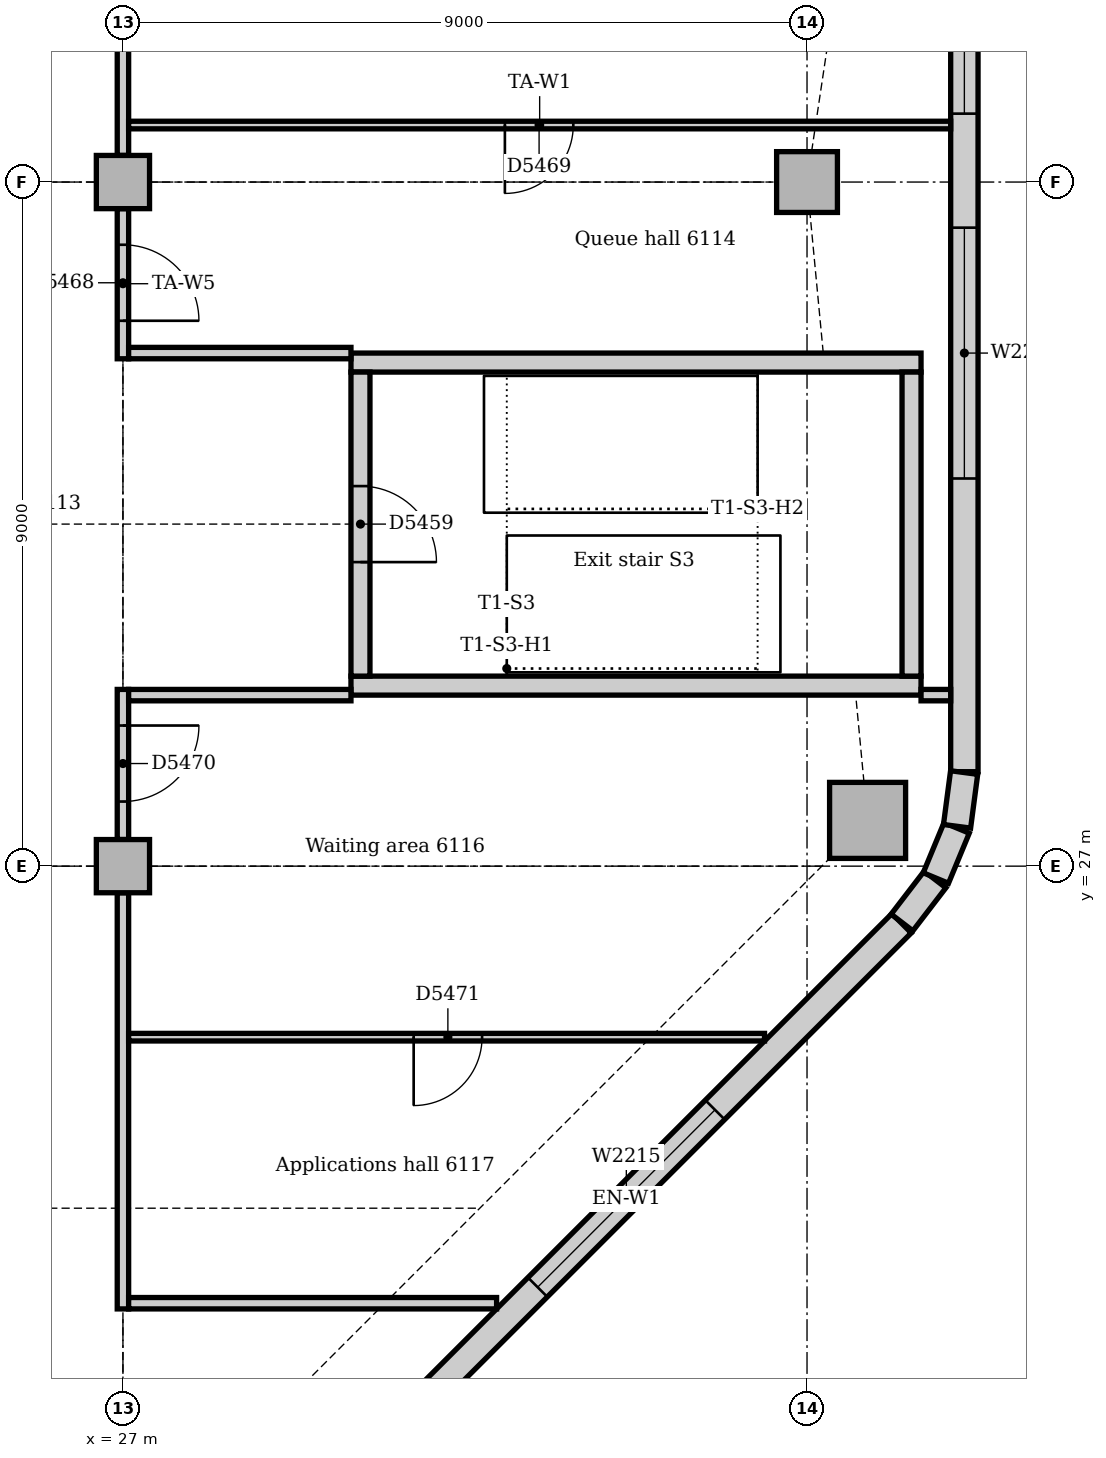
"""IFC4 building model, lengths in metres.
Left out: names, types, materials, properties, quantities, classifications, styles, units other than length and angle.
Written with IfcOpenShell. Run it as: python <this file> out.ifc"""

import sys

from ifc_helpers import new_model, si_unit, direction, frame, frame_2d, origin, origin_2d, place, context, subcontext, project, spatial, rectangle, extrude, element, fill, save


model = new_model("IFC4")
c1 = context("Model", 3, precision=1e-05, world=origin(), true_north=direction((0.0, 1.0)))
c2 = subcontext(c1, "Body", "Model", "MODEL_VIEW")
j1 = project(units=[si_unit("LENGTHUNIT", "METRE"), si_unit("PLANEANGLEUNIT", "RADIAN")], contexts=[c1])
p1 = place(None, origin())
s1 = spatial("IfcSite", under=j1, at=p1, CompositionType="ELEMENT")
p2 = place(p1, origin())
s2 = spatial("IfcBuilding", under=s1, at=p2, CompositionType="ELEMENT")
p3 = place(p2, frame((0.0, 0.0, 255.0)))
s3 = spatial("IfcBuildingStorey", under=s2, at=p3, CompositionType="ELEMENT", Elevation=255.0)
for number, where, z_axis, x_axis in (
    (1, (30.0, 29.375, 0.0), (0.0, 0.0, 1.0), (1.0, 0.0, 0.0)),
    (2, (37.5, 33.625, 0.0), (0.0, 0.0, 1.0), (-1.0, 0.0, 0.0)),
):
    element("IfcWall", number, at=place(p3, frame(where, z_axis=z_axis, x_axis=x_axis)), inside=s3, PredefinedType="SOLIDWALL", context=c2, shape_type="SweptSolid", body=[
        extrude(rectangle(XDim=7.5, YDim=0.25, at=frame_2d((3.75, 0.0))), origin(), (0.0, 0.0, 1.0), 4.0),
    ])
p4 = place(p3, frame((37.375, 29.5, 0.0), z_axis=(0.0, 0.0, 1.0), x_axis=(0.0, 1.0, 0.0)))
e3 = element("IfcWall", 3, at=p4, inside=s3, PredefinedType="SOLIDWALL", context=c2, shape_type="SweptSolid", body=[
    extrude(rectangle(XDim=4.0, YDim=0.25, at=frame_2d((2.0, 0.0))), origin(), (0.0, 0.0, 1.0), 4.0),
])
p5 = place(p3, frame((30.125, 33.5, 0.0), z_axis=(0.0, 0.0, 1.0), x_axis=(0.0, -1.0, 0.0)))
e4 = element("IfcWall", 4, at=p5, inside=s3, PredefinedType="SOLIDWALL", context=c2, shape_type="SweptSolid", body=[
    extrude(rectangle(XDim=4.0, YDim=0.25, at=frame_2d((2.0, 0.0))), origin(), (0.0, 0.0, 1.0), 4.0),
])
p6 = place(p5, frame((1.5, 0.0, 0.0)))
e5 = element("IfcOpeningElement", 5, at=p6, cuts=e4, PredefinedType="OPENING", context=c2, shape_type="SweptSolid", body=[
    extrude(rectangle(XDim=1.0, YDim=2.1, at=frame_2d((0.5, 1.05))), frame((0.0, 0.135, 0.0), z_axis=(0.0, -1.0, 0.0), x_axis=(1.0, 0.0, 0.0)), (0.0, 0.0, 1.0), 0.27),
])
p7 = place(p3, frame((36.797, 27.602, 0.0), z_axis=(0.0, 0.0, 1.0), x_axis=(1.0, 0.0, 0.0)))
e6 = element("IfcColumn", 6, at=p7, inside=s3, PredefinedType="COLUMN", context=c2, shape_type="SweptSolid", body=[
    extrude(rectangle(XDim=1.0, YDim=1.0, at=origin_2d()), origin(), (0.0, 0.0, 1.0), 3.85),
])
p8 = place(p3, frame((36.0, 36.0, 0.0), z_axis=(0.0, 0.0, 1.0), x_axis=(1.0, 0.0, 0.0)))
e7 = element("IfcColumn", 7, at=p8, inside=s3, PredefinedType="COLUMN", context=c2, shape_type="SweptSolid", body=[
    extrude(rectangle(XDim=0.8, YDim=0.8, at=origin_2d()), origin(), (0.0, 0.0, 1.0), 3.85),
])
for number, where, z_axis, x_axis in (
    (8, (27.0, 27.0, 0.0), (0.0, 0.0, 1.0), (1.0, 0.0, 0.0)),
    (9, (27.0, 36.0, 0.0), (0.0, 0.0, 1.0), (1.0, 0.0, 0.0)),
):
    element("IfcColumn", number, at=place(p3, frame(where, z_axis=z_axis, x_axis=x_axis)), inside=s3, PredefinedType="COLUMN", context=c2, shape_type="SweptSolid", body=[
        extrude(rectangle(XDim=0.7, YDim=0.7, at=origin_2d()), origin(), (0.0, 0.0, 1.0), 3.85),
    ])
p9 = place(p3, frame((30.001, 19.006, 0.0), z_axis=(0.0, 0.0, 1.0), x_axis=(0.707106781187, 0.707106781187, 0.0)))
e10 = element("IfcWall", 10, at=p9, inside=s3, PredefinedType="STANDARD", context=c2, shape_type="SweptSolid", body=[
    extrude(rectangle(XDim=10.243, YDim=0.36, at=frame_2d((5.121, 0.0))), origin(), (0.0, 0.0, 1.0), 3.85),
])
p10 = place(p9, frame((3.471, 0.0, 0.9)))
e11 = element("IfcOpeningElement", 11, at=p10, cuts=e10, PredefinedType="OPENING", context=c2, shape_type="SweptSolid", body=[
    extrude(rectangle(XDim=3.3, YDim=1.6, at=frame_2d((1.65, 0.8))), frame((0.0, 0.19, 0.0), z_axis=(0.0, -1.0, 0.0), x_axis=(1.0, 0.0, 0.0)), (0.0, 0.0, 1.0), 0.38),
])
p11 = place(p3, frame((38.07, 28.243, 0.0), z_axis=(0.0, 0.0, 1.0), x_axis=(0.0, 1.0, 0.0)))
e12 = element("IfcWall", 12, at=p11, inside=s3, PredefinedType="STANDARD", context=c2, shape_type="SweptSolid", body=[
    extrude(rectangle(XDim=24.515, YDim=0.36, at=frame_2d((12.257, 0.0))), origin(), (0.0, 0.0, 1.0), 3.85),
])
p12 = place(p11, frame((3.857, 0.0, 0.9)))
e13 = element("IfcOpeningElement", 13, at=p12, cuts=e12, PredefinedType="OPENING", context=c2, shape_type="SweptSolid", body=[
    extrude(rectangle(XDim=3.3, YDim=1.6, at=frame_2d((1.65, 0.8))), frame((0.0, 0.19, 0.0), z_axis=(0.0, -1.0, 0.0), x_axis=(1.0, 0.0, 0.0)), (0.0, 0.0, 1.0), 0.38),
])
p13 = place(p11, frame((8.657, 0.0, 0.9)))
e14 = element("IfcOpeningElement", 14, at=p13, cuts=e12, PredefinedType="OPENING", context=c2, shape_type="SweptSolid", body=[
    extrude(rectangle(XDim=3.3, YDim=1.6, at=frame_2d((1.65, 0.8))), frame((0.0, 0.19, 0.0), z_axis=(0.0, -1.0, 0.0), x_axis=(1.0, 0.0, 0.0)), (0.0, 0.0, 1.0), 0.38),
])
p14 = place(p11, frame((12.857, 0.0, 0.9)))
e15 = element("IfcOpeningElement", 15, at=p14, cuts=e12, PredefinedType="OPENING", context=c2, shape_type="SweptSolid", body=[
    extrude(rectangle(XDim=3.3, YDim=1.6, at=frame_2d((1.65, 0.8))), frame((0.0, 0.19, 0.0), z_axis=(0.0, -1.0, 0.0), x_axis=(1.0, 0.0, 0.0)), (0.0, 0.0, 1.0), 0.38),
])
p15 = place(p11, frame((17.357, 0.0, 0.9)))
e16 = element("IfcOpeningElement", 16, at=p15, cuts=e12, PredefinedType="OPENING", context=c2, shape_type="SweptSolid", body=[
    extrude(rectangle(XDim=3.3, YDim=1.6, at=frame_2d((1.65, 0.8))), frame((0.0, 0.19, 0.0), z_axis=(0.0, -1.0, 0.0), x_axis=(1.0, 0.0, 0.0)), (0.0, 0.0, 1.0), 0.38),
])
p16 = place(p3, frame((37.25, 26.259, 0.0), z_axis=(0.0, 0.0, 1.0), x_axis=(0.608802368033, 0.793321924995, 0.0)))
e17 = element("IfcWall", 17, at=p16, inside=s3, PredefinedType="STANDARD", context=c2, shape_type="SweptSolid", body=[
    extrude(rectangle(XDim=0.713, YDim=0.36, at=frame_2d((0.357, 0.0))), origin(), (0.0, 0.0, 1.0), 3.85),
])
for number, where, z_axis, x_axis in (
    (18, (37.695, 26.844, 0.0), (0.0, 0.0, 1.0), (0.383, 0.924, 0.0)),
    (19, (37.974, 27.524, 0.0), (0.0, 0.0, 1.0), (0.131, 0.991, 0.0)),
):
    element("IfcWall", number, at=place(p3, frame(where, z_axis=z_axis, x_axis=x_axis)), inside=s3, PredefinedType="STANDARD", context=c2, shape_type="SweptSolid", body=[
        extrude(rectangle(XDim=0.713, YDim=0.36, at=frame_2d((0.356, 0.0))), origin(), (0.0, 0.0, 1.0), 3.85),
    ])
p17 = place(p3, frame((27.0, 33.675, 0.0), z_axis=(0.0, 0.0, 1.0), x_axis=(0.0, 1.0, 0.0)))
e20 = element("IfcWall", 20, at=p17, inside=s3, PredefinedType="PARTITIONING", context=c2, shape_type="SweptSolid", body=[
    extrude(rectangle(XDim=1.975, YDim=0.15, at=frame_2d((0.988, 0.0))), origin(), (0.0, 0.0, 1.0), 3.4),
])
p18 = place(p17, frame((0.5, 0.0, 0.0)))
e21 = element("IfcOpeningElement", 21, at=p18, cuts=e20, PredefinedType="OPENING", context=c2, shape_type="SweptSolid", body=[
    extrude(rectangle(XDim=1.0, YDim=2.1, at=frame_2d((0.5, 1.05))), frame((0.0, 0.085, 0.0), z_axis=(0.0, -1.0, 0.0), x_axis=(1.0, 0.0, 0.0)), (0.0, 0.0, 1.0), 0.17),
])
p19 = place(p3, frame((27.0, 36.35, 0.0), z_axis=(0.0, 0.0, 1.0), x_axis=(0.0, 1.0, 0.0)))
e22 = element("IfcWall", 22, at=p19, inside=s3, PredefinedType="PARTITIONING", context=c2, shape_type="SweptSolid", body=[
    extrude(rectangle(XDim=7.4, YDim=0.15, at=frame_2d((3.7, 0.0))), origin(), (0.0, 0.0, 1.0), 3.4),
])
p20 = place(p3, frame((27.0, 21.175, 0.0), z_axis=(0.0, 0.0, 1.0), x_axis=(0.0, 1.0, 0.0)))
e23 = element("IfcWall", 23, at=p20, inside=s3, PredefinedType="PARTITIONING", context=c2, shape_type="SweptSolid", body=[
    extrude(rectangle(XDim=5.475, YDim=0.15, at=frame_2d((2.737, 0.0))), origin(), (0.0, 0.0, 1.0), 3.4),
])
p21 = place(p3, frame((27.0, 27.35, 0.0), z_axis=(0.0, 0.0, 1.0), x_axis=(0.0, 1.0, 0.0)))
e24 = element("IfcWall", 24, at=p21, inside=s3, PredefinedType="PARTITIONING", context=c2, shape_type="SweptSolid", body=[
    extrude(rectangle(XDim=1.975, YDim=0.15, at=frame_2d((0.988, 0.0))), origin(), (0.0, 0.0, 1.0), 3.4),
])
p22 = place(p21, frame((0.5, 0.0, 0.0)))
e25 = element("IfcOpeningElement", 25, at=p22, cuts=e24, PredefinedType="OPENING", context=c2, shape_type="SweptSolid", body=[
    extrude(rectangle(XDim=1.0, YDim=2.1, at=frame_2d((0.5, 1.05))), frame((0.0, 0.085, 0.0), z_axis=(0.0, -1.0, 0.0), x_axis=(1.0, 0.0, 0.0)), (0.0, 0.0, 1.0), 0.17),
])
p23 = place(p3, frame((27.075, 21.25, 0.0), z_axis=(0.0, 0.0, 1.0), x_axis=(1.0, 0.0, 0.0)))
e26 = element("IfcWall", 26, at=p23, inside=s3, PredefinedType="PARTITIONING", context=c2, shape_type="SweptSolid", body=[
    extrude(rectangle(XDim=4.841, YDim=0.15, at=frame_2d((2.421, 0.0))), origin(), (0.0, 0.0, 1.0), 3.85),
])
for number, where, z_axis, x_axis in (
    (27, (27.075, 29.25, 0.0), (0.0, 0.0, 1.0), (1.0, 0.0, 0.0)),
    (28, (27.075, 33.75, 0.0), (0.0, 0.0, 1.0), (1.0, 0.0, 0.0)),
):
    element("IfcWall", number, at=place(p3, frame(where, z_axis=z_axis, x_axis=x_axis)), inside=s3, PredefinedType="PARTITIONING", context=c2, shape_type="SweptSolid", body=[
        extrude(rectangle(XDim=2.925, YDim=0.15, at=frame_2d((1.462, 0.0))), origin(), (0.0, 0.0, 1.0), 3.85),
    ])
p24 = place(p3, frame((37.5, 29.25, 0.0), z_axis=(0.0, 0.0, 1.0), x_axis=(1.0, 0.0, 0.0)))
e29 = element("IfcWall", 29, at=p24, inside=s3, PredefinedType="PARTITIONING", context=c2, shape_type="SweptSolid", body=[
    extrude(rectangle(XDim=0.39, YDim=0.15, at=frame_2d((0.195, 0.0))), origin(), (0.0, 0.0, 1.0), 3.85),
])
p25 = place(p3, frame((27.075, 36.75, 0.0), z_axis=(0.0, 0.0, 1.0), x_axis=(1.0, 0.0, 0.0)))
e30 = element("IfcWall", 30, at=p25, inside=s3, PredefinedType="PARTITIONING", context=c2, shape_type="SweptSolid", body=[
    extrude(rectangle(XDim=10.815, YDim=0.1, at=frame_2d((5.407, 0.0))), origin(), (0.0, 0.0, 1.0), 3.85),
])
p26 = place(p25, frame((4.95, 0.0, 0.0)))
e31 = element("IfcOpeningElement", 31, at=p26, cuts=e30, PredefinedType="OPENING", context=c2, shape_type="SweptSolid", body=[
    extrude(rectangle(XDim=0.9, YDim=2.1, at=frame_2d((0.45, 1.05))), frame((0.0, 0.06, 0.0), z_axis=(0.0, -1.0, 0.0), x_axis=(1.0, 0.0, 0.0)), (0.0, 0.0, 1.0), 0.12),
])
p27 = place(p3, frame((27.075, 24.75, 0.0), z_axis=(0.0, 0.0, 1.0), x_axis=(1.0, 0.0, 0.0)))
e32 = element("IfcWall", 32, at=p27, inside=s3, PredefinedType="PARTITIONING", context=c2, shape_type="SweptSolid", body=[
    extrude(rectangle(XDim=8.366, YDim=0.1, at=frame_2d((4.183, 0.0))), origin(), (0.0, 0.0, 1.0), 3.85),
])
p28 = place(p27, frame((3.75, 0.0, 0.0)))
e33 = element("IfcOpeningElement", 33, at=p28, cuts=e32, PredefinedType="OPENING", context=c2, shape_type="SweptSolid", body=[
    extrude(rectangle(XDim=0.9, YDim=2.1, at=frame_2d((0.45, 1.05))), frame((0.0, 0.06, 0.0), z_axis=(0.0, -1.0, 0.0), x_axis=(1.0, 0.0, 0.0)), (0.0, 0.0, 1.0), 0.12),
])
p29 = place(p10, origin())
e34 = element("IfcWindow", 34, at=p29, inside=s3, PartitioningType="SINGLE_PANEL", PredefinedType="WINDOW", context=c2, shape_type="SweptSolid", body=[
    extrude(rectangle(XDim=3.3, YDim=1.6, at=frame_2d((1.65, 0.8))), frame((0.0, 0.13, 0.0), z_axis=(0.0, -1.0, 0.0), x_axis=(1.0, 0.0, 0.0)), (0.0, 0.0, 1.0), 0.06),
])
fill(e11, e34)
p30 = place(p12, origin())
e35 = element("IfcWindow", 35, at=p30, inside=s3, PartitioningType="SINGLE_PANEL", PredefinedType="WINDOW", context=c2, shape_type="SweptSolid", body=[
    extrude(rectangle(XDim=3.3, YDim=1.6, at=frame_2d((1.65, 0.8))), frame((0.0, 0.13, 0.0), z_axis=(0.0, -1.0, 0.0), x_axis=(1.0, 0.0, 0.0)), (0.0, 0.0, 1.0), 0.06),
])
fill(e13, e35)
p31 = place(p13, origin())
e36 = element("IfcWindow", 36, at=p31, inside=s3, PartitioningType="SINGLE_PANEL", PredefinedType="WINDOW", context=c2, shape_type="SweptSolid", body=[
    extrude(rectangle(XDim=3.3, YDim=1.6, at=frame_2d((1.65, 0.8))), frame((0.0, 0.13, 0.0), z_axis=(0.0, -1.0, 0.0), x_axis=(1.0, 0.0, 0.0)), (0.0, 0.0, 1.0), 0.06),
])
fill(e14, e36)
p32 = place(p6, origin())
e37 = element("IfcDoor", 37, at=p32, inside=s3, OperationType="SINGLE_SWING_RIGHT", PredefinedType="DOOR", context=c2, shape_type="SweptSolid", body=[
    extrude(rectangle(XDim=1.0, YDim=2.1, at=frame_2d((0.5, 1.05))), frame((0.0, 0.025, 0.0), z_axis=(0.0, -1.0, 0.0), x_axis=(1.0, 0.0, 0.0)), (0.0, 0.0, 1.0), 0.05),
])
fill(e5, e37)
p33 = place(p18, frame((1.0, 0.0, 0.0), z_axis=(0.0, 0.0, 1.0), x_axis=(-1.0, 0.0, 0.0)))
e38 = element("IfcDoor", 38, at=p33, inside=s3, OperationType="SINGLE_SWING_RIGHT", PredefinedType="DOOR", context=c2, shape_type="SweptSolid", body=[
    extrude(rectangle(XDim=1.0, YDim=2.1, at=frame_2d((0.5, 1.05))), frame((0.0, 0.025, 0.0), z_axis=(0.0, -1.0, 0.0), x_axis=(1.0, 0.0, 0.0)), (0.0, 0.0, 1.0), 0.05),
])
fill(e21, e38)
p34 = place(p26, frame((0.9, 0.0, 0.0), z_axis=(0.0, 0.0, 1.0), x_axis=(-1.0, 0.0, 0.0)))
e39 = element("IfcDoor", 39, at=p34, inside=s3, OperationType="SINGLE_SWING_RIGHT", PredefinedType="DOOR", context=c2, shape_type="SweptSolid", body=[
    extrude(rectangle(XDim=0.9, YDim=2.1, at=frame_2d((0.45, 1.05))), frame((0.0, 0.025, 0.0), z_axis=(0.0, -1.0, 0.0), x_axis=(1.0, 0.0, 0.0)), (0.0, 0.0, 1.0), 0.05),
])
fill(e31, e39)
p35 = place(p22, frame((1.0, 0.0, 0.0), z_axis=(0.0, 0.0, 1.0), x_axis=(-1.0, 0.0, 0.0)))
e40 = element("IfcDoor", 40, at=p35, inside=s3, OperationType="SINGLE_SWING_LEFT", PredefinedType="DOOR", context=c2, shape_type="SweptSolid", body=[
    extrude(rectangle(XDim=1.0, YDim=2.1, at=frame_2d((0.5, 1.05))), frame((0.0, 0.025, 0.0), z_axis=(0.0, -1.0, 0.0), x_axis=(1.0, 0.0, 0.0)), (0.0, 0.0, 1.0), 0.05),
])
fill(e25, e40)
p36 = place(p28, frame((0.9, 0.0, 0.0), z_axis=(0.0, 0.0, 1.0), x_axis=(-1.0, 0.0, 0.0)))
e41 = element("IfcDoor", 41, at=p36, inside=s3, OperationType="SINGLE_SWING_RIGHT", PredefinedType="DOOR", context=c2, shape_type="SweptSolid", body=[
    extrude(rectangle(XDim=0.9, YDim=2.1, at=frame_2d((0.45, 1.05))), frame((0.0, 0.025, 0.0), z_axis=(0.0, -1.0, 0.0), x_axis=(1.0, 0.0, 0.0)), (0.0, 0.0, 1.0), 0.05),
])
fill(e33, e41)
save(model, sys.argv[1])
